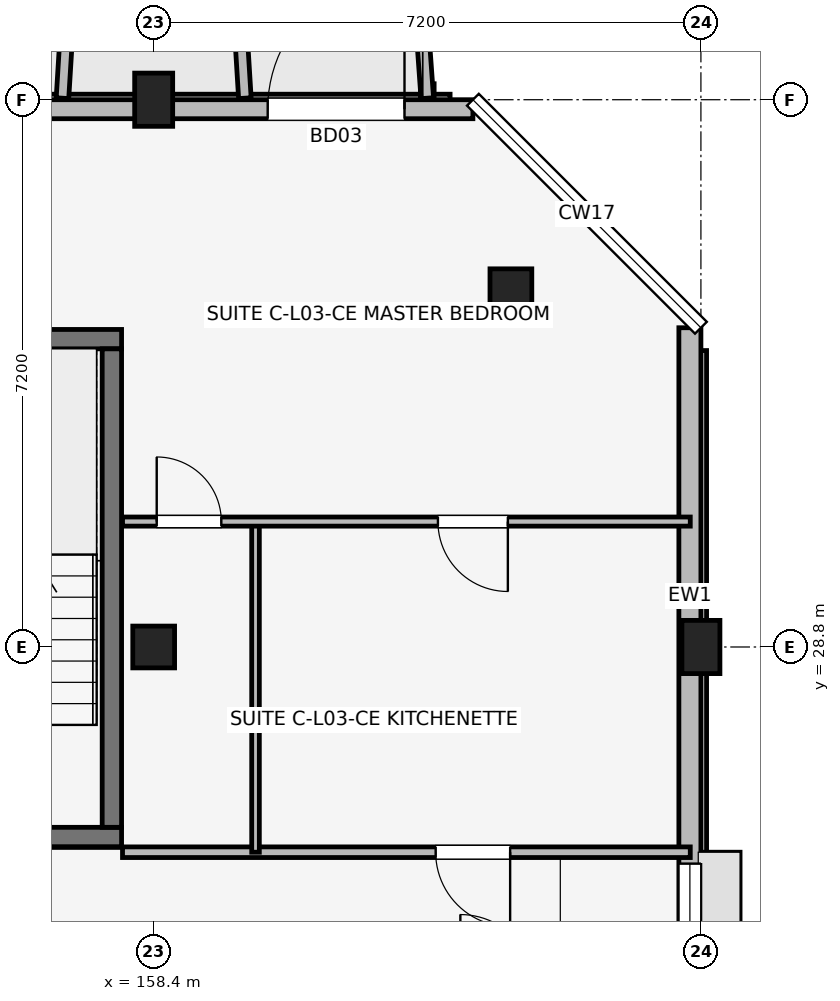
"""IFC4 building model, lengths in metres.
Left out: names, types, materials, properties, quantities, classifications, styles, units other than length and angle.
Written with IfcOpenShell. Run it as: python <this file> out.ifc"""

import sys

from ifc_helpers import new_model, si_unit, direction, frame, frame_2d, origin, origin_2d, place, context, subcontext, project, spatial, rectangle, extrude, element, fill, save


model = new_model("IFC4")
c1 = context("Model", 3, precision=1e-05, world=origin(), true_north=direction((0.0, 1.0)))
c2 = subcontext(c1, "Body", "Model", "MODEL_VIEW")
j1 = project(units=[si_unit("LENGTHUNIT", "METRE"), si_unit("PLANEANGLEUNIT", "RADIAN")], contexts=[c1])
p1 = place(None, origin())
s1 = spatial("IfcSite", under=j1, at=p1, CompositionType="ELEMENT")
p2 = place(p1, origin())
s2 = spatial("IfcBuilding", under=s1, at=p2, CompositionType="ELEMENT")
p3 = place(p2, frame((0.0, 0.0, 11.85)))
s3 = spatial("IfcBuildingStorey", under=s2, at=p3, CompositionType="ELEMENT", Elevation=11.85)
p4 = place(p3, frame((158.4, 28.8, 0.0), z_axis=(0.0, 0.0, 1.0), x_axis=(1.0, 0.0, 0.0)))
e1 = element("IfcColumn", 1, at=p4, inside=s3, PredefinedType="COLUMN", context=c2, shape_type="SweptSolid", body=[
    extrude(rectangle(XDim=0.55, YDim=0.55, at=origin_2d()), origin(), (0.0, 0.0, 1.0), 3.15),
])
for number, where, z_axis, x_axis in (
    (2, (158.4, 36.0, 0.0), (0.0, 0.0, 1.0), (1.0, 0.0, 0.0)),
    (3, (165.6, 28.8, 0.0), (0.0, 0.0, 1.0), (1.0, 0.0, 0.0)),
):
    element("IfcColumn", number, at=place(p3, frame(where, z_axis=z_axis, x_axis=x_axis)), inside=s3, PredefinedType="COLUMN", context=c2, shape_type="SweptSolid", body=[
        extrude(rectangle(XDim=0.5, YDim=0.7, at=origin_2d()), origin(), (0.0, 0.0, 1.0), 3.15),
    ])
p5 = place(p3, frame((163.1, 33.5, 0.0), z_axis=(0.0, 0.0, 1.0), x_axis=(1.0, 0.0, 0.0)))
e4 = element("IfcColumn", 4, at=p5, inside=s3, PredefinedType="COLUMN", context=c2, shape_type="SweptSolid", body=[
    extrude(rectangle(XDim=0.55, YDim=0.55, at=origin_2d()), origin(), (0.0, 0.0, 1.0), 3.15),
])
p6 = place(p3, frame((154.673, 26.3, 0.0), z_axis=(0.0, 0.0, 1.0), x_axis=(1.0, 0.0, 0.0)))
e5 = element("IfcWall", 5, at=p6, inside=s3, PredefinedType="SHEAR", context=c2, shape_type="SweptSolid", body=[
    extrude(rectangle(XDim=3.305, YDim=0.255, at=frame_2d((1.652, 0.0))), origin(), (0.0, 0.0, 1.0), 3.15),
])
p7 = place(p6, frame((1.127, 0.0, 0.0)))
e6 = element("IfcOpeningElement", 6, at=p7, cuts=e5, PredefinedType="OPENING", context=c2, shape_type="SweptSolid", body=[
    extrude(rectangle(XDim=1.05, YDim=2.12, at=frame_2d((0.525, 1.06))), frame((0.0, 0.137, 0.0), z_axis=(0.0, -1.0, 0.0), x_axis=(1.0, 0.0, 0.0)), (0.0, 0.0, 1.0), 0.275),
])
p8 = place(p3, frame((154.673, 32.85, 0.0), z_axis=(0.0, 0.0, 1.0), x_axis=(1.0, 0.0, 0.0)))
e7 = element("IfcWall", 7, at=p8, inside=s3, PredefinedType="SHEAR", context=c2, shape_type="SweptSolid", body=[
    extrude(rectangle(XDim=3.305, YDim=0.255, at=frame_2d((1.652, 0.0))), origin(), (0.0, 0.0, 1.0), 3.15),
])
p9 = place(p3, frame((157.85, 26.427, 0.0), z_axis=(0.0, 0.0, 1.0), x_axis=(0.0, 1.0, 0.0)))
e8 = element("IfcWall", 8, at=p9, inside=s3, PredefinedType="SHEAR", context=c2, shape_type="SweptSolid", body=[
    extrude(rectangle(XDim=6.295, YDim=0.255, at=frame_2d((3.147, 0.0))), origin(), (0.0, 0.0, 1.0), 3.15),
])
p10 = place(p3, frame((165.455, 17.4, 0.0), z_axis=(0.0, 0.0, 1.0), x_axis=(0.0, 1.0, 0.0)))
e9 = element("IfcWall", 9, at=p10, inside=s3, PredefinedType="SOLIDWALL", context=c2, shape_type="SweptSolid", body=[
    extrude(rectangle(XDim=15.6, YDim=0.29, at=frame_2d((7.8, 0.0))), origin(), (0.0, 0.0, 1.0), 2.38),
])
p11 = place(p10, frame((7.05, 0.0, 1.05)))
e10 = element("IfcOpeningElement", 10, at=p11, cuts=e9, PredefinedType="OPENING", context=c2, shape_type="SweptSolid", body=[
    extrude(rectangle(XDim=1.5, YDim=1.15, at=frame_2d((0.75, 0.575))), frame((0.0, 0.155, 0.0), z_axis=(0.0, -1.0, 0.0), x_axis=(1.0, 0.0, 0.0)), (0.0, 0.0, 1.0), 0.31),
])
p12 = place(p10, frame((1.3, 0.0, 0.67)))
e11 = element("IfcOpeningElement", 11, at=p12, cuts=e9, PredefinedType="OPENING", context=c2, shape_type="SweptSolid", body=[
    extrude(rectangle(XDim=1.42, YDim=1.6, at=frame_2d((0.71, 0.8))), frame((0.0, 0.155, 0.0), z_axis=(0.0, -1.0, 0.0), x_axis=(1.0, 0.0, 0.0)), (0.0, 0.0, 1.0), 0.31),
])
p13 = place(p3, frame((162.6, 35.875, 0.0), z_axis=(0.0, 0.0, 1.0), x_axis=(-1.0, 0.0, 0.0)))
e12 = element("IfcWall", 12, at=p13, inside=s3, PredefinedType="SOLIDWALL", context=c2, shape_type="SweptSolid", body=[
    extrude(rectangle(XDim=30.0, YDim=0.25, at=frame_2d((15.0, 0.0))), origin(), (0.0, 0.0, 1.0), 2.43),
])
p14 = place(p13, frame((29.025, 0.0, 0.0), z_axis=(0.0, 0.0, 1.0), x_axis=(-1.0, 0.0, 0.0)))
e13 = element("IfcOpeningElement", 13, at=p14, cuts=e12, PredefinedType="OPENING", context=c2, shape_type="SweptSolid", body=[
    extrude(rectangle(XDim=1.65, YDim=2.15, at=frame_2d((0.825, 1.075))), frame((0.0, 0.135, 0.0), z_axis=(0.0, -1.0, 0.0), x_axis=(1.0, 0.0, 0.0)), (0.0, 0.0, 1.0), 0.27),
])
p15 = place(p13, frame((2.7, 0.0, 0.0), z_axis=(0.0, 0.0, 1.0), x_axis=(-1.0, 0.0, 0.0)))
e14 = element("IfcOpeningElement", 14, at=p15, cuts=e12, PredefinedType="OPENING", context=c2, shape_type="SweptSolid", body=[
    extrude(rectangle(XDim=1.8, YDim=2.15, at=frame_2d((0.9, 1.075))), frame((0.0, 0.135, 0.0), z_axis=(0.0, -1.0, 0.0), x_axis=(1.0, 0.0, 0.0)), (0.0, 0.0, 1.0), 0.27),
])
p16 = place(p13, frame((15.43, 0.0, 0.5)))
e15 = element("IfcOpeningElement", 15, at=p16, cuts=e12, PredefinedType="OPENING", context=c2, shape_type="SweptSolid", body=[
    extrude(rectangle(XDim=0.75, YDim=1.75, at=frame_2d((0.375, 0.875))), frame((0.0, 0.135, 0.0), z_axis=(0.0, -1.0, 0.0), x_axis=(1.0, 0.0, 0.0)), (0.0, 0.0, 1.0), 0.27),
])
p17 = place(p13, frame((8.075, 0.0, 0.67)))
e16 = element("IfcOpeningElement", 16, at=p17, cuts=e12, PredefinedType="OPENING", context=c2, shape_type="SweptSolid", body=[
    extrude(rectangle(XDim=2.0, YDim=1.65, at=frame_2d((1.0, 0.825))), frame((0.0, 0.135, 0.0), z_axis=(0.0, -1.0, 0.0), x_axis=(1.0, 0.0, 0.0)), (0.0, 0.0, 1.0), 0.27),
])
p18 = place(p13, frame((19.97, 0.0, 0.7)))
e17 = element("IfcOpeningElement", 17, at=p18, cuts=e12, PredefinedType="OPENING", context=c2, shape_type="SweptSolid", body=[
    extrude(rectangle(XDim=1.86, YDim=1.6, at=frame_2d((0.93, 0.8))), frame((0.0, 0.135, 0.0), z_axis=(0.0, -1.0, 0.0), x_axis=(1.0, 0.0, 0.0)), (0.0, 0.0, 1.0), 0.27),
])
p19 = place(p3, frame((157.2, 36.02, 0.0), z_axis=(0.0, 0.0, 1.0), x_axis=(0.061170732449, 0.998127317276, 0.0)))
e18 = element("IfcWall", 18, at=p19, inside=s3, PredefinedType="ELEMENTEDWALL", context=c2, shape_type="SweptSolid", body=[
    extrude(rectangle(XDim=1.964, YDim=0.165, at=frame_2d((0.982, 0.0))), origin(), (0.0, 0.0, 1.0), 2.58),
])
p20 = place(p3, frame((159.6, 36.02, 0.0), z_axis=(0.0, 0.0, 1.0), x_axis=(-0.061170732449, 0.998127317276, 0.0)))
e19 = element("IfcWall", 19, at=p20, inside=s3, PredefinedType="ELEMENTEDWALL", context=c2, shape_type="SweptSolid", body=[
    extrude(rectangle(XDim=1.964, YDim=0.165, at=frame_2d((0.982, 0.0))), origin(), (0.0, 0.0, 1.0), 2.95),
])
p21 = place(p3, frame((162.0, 36.02, 0.0), z_axis=(0.0, 0.0, 1.0), x_axis=(-0.071194071069, 0.997462482625, 0.0)))
e20 = element("IfcWall", 20, at=p21, inside=s3, PredefinedType="ELEMENTEDWALL", context=c2, shape_type="SweptSolid", body=[
    extrude(rectangle(XDim=1.965, YDim=0.165, at=frame_2d((0.982, 0.0))), origin(), (0.0, 0.0, 1.0), 2.95),
])
p22 = place(p3, frame((157.99, 26.1, 0.0), z_axis=(0.0, 0.0, 1.0), x_axis=(1.0, 0.0, 0.0)))
e21 = element("IfcWall", 21, at=p22, inside=s3, PredefinedType="PARTITIONING", context=c2, shape_type="SweptSolid", body=[
    extrude(rectangle(XDim=7.47, YDim=0.14, at=frame_2d((3.735, 0.0))), origin(), (0.0, 0.0, 1.0), 2.38),
])
p23 = place(p22, frame((5.1, 0.0, 0.0), z_axis=(0.0, 0.0, 1.0), x_axis=(-1.0, 0.0, 0.0)))
e22 = element("IfcOpeningElement", 22, at=p23, cuts=e21, PredefinedType="OPENING", context=c2, shape_type="SweptSolid", body=[
    extrude(rectangle(XDim=0.98, YDim=2.1, at=frame_2d((0.49, 1.05))), frame((0.0, 0.08, 0.0), z_axis=(0.0, -1.0, 0.0), x_axis=(1.0, 0.0, 0.0)), (0.0, 0.0, 1.0), 0.16),
])
p24 = place(p3, frame((159.74, 26.1, 0.0), z_axis=(0.0, 0.0, 1.0), x_axis=(0.0, 1.0, 0.0)))
e23 = element("IfcWall", 23, at=p24, inside=s3, PredefinedType="PARTITIONING", context=c2, shape_type="SweptSolid", body=[
    extrude(rectangle(XDim=4.35, YDim=0.1, at=frame_2d((2.175, 0.0))), origin(), (0.0, 0.0, 1.0), 2.375),
])
p25 = place(p3, frame((157.99, 30.45, 0.0), z_axis=(0.0, 0.0, 1.0), x_axis=(1.0, 0.0, 0.0)))
e24 = element("IfcWall", 24, at=p25, inside=s3, PredefinedType="PARTITIONING", context=c2, shape_type="SweptSolid", body=[
    extrude(rectangle(XDim=7.47, YDim=0.12, at=frame_2d((3.735, 0.0))), origin(), (0.0, 0.0, 1.0), 2.38),
])
p26 = place(p25, frame((0.45, 0.0, 0.0)))
e25 = element("IfcOpeningElement", 25, at=p26, cuts=e24, PredefinedType="OPENING", context=c2, shape_type="SweptSolid", body=[
    extrude(rectangle(XDim=0.85, YDim=2.08, at=frame_2d((0.425, 1.04))), frame((0.0, 0.07, 0.0), z_axis=(0.0, -1.0, 0.0), x_axis=(1.0, 0.0, 0.0)), (0.0, 0.0, 1.0), 0.14),
])
p27 = place(p25, frame((5.07, 0.0, 0.0), z_axis=(0.0, 0.0, 1.0), x_axis=(-1.0, 0.0, 0.0)))
e26 = element("IfcOpeningElement", 26, at=p27, cuts=e24, PredefinedType="OPENING", context=c2, shape_type="SweptSolid", body=[
    extrude(rectangle(XDim=0.92, YDim=2.08, at=frame_2d((0.46, 1.04))), frame((0.0, 0.07, 0.0), z_axis=(0.0, -1.0, 0.0), x_axis=(1.0, 0.0, 0.0)), (0.0, 0.0, 1.0), 0.14),
])
p28 = place(p15, origin())
e27 = element("IfcDoor", 27, at=p28, inside=s3, OperationType="SINGLE_SWING_LEFT", PredefinedType="DOOR", context=c2, shape_type="SweptSolid", body=[
    extrude(rectangle(XDim=1.8, YDim=2.15, at=frame_2d((0.9, 1.075))), frame((0.0, 0.025, 0.0), z_axis=(0.0, -1.0, 0.0), x_axis=(1.0, 0.0, 0.0)), (0.0, 0.0, 1.0), 0.05),
])
fill(e14, e27)
p29 = place(p11, origin())
e28 = element("IfcWindow", 28, at=p29, inside=s3, PartitioningType="SINGLE_PANEL", PredefinedType="WINDOW", context=c2, shape_type="SweptSolid", body=[
    extrude(rectangle(XDim=1.5, YDim=1.15, at=frame_2d((0.75, 0.575))), frame((0.0, 0.03, 0.0), z_axis=(0.0, -1.0, 0.0), x_axis=(1.0, 0.0, 0.0)), (0.0, 0.0, 1.0), 0.06),
])
fill(e10, e28)
p30 = place(p23, origin())
e29 = element("IfcDoor", 29, at=p30, inside=s3, OperationType="SINGLE_SWING_RIGHT", PredefinedType="DOOR", context=c2, shape_type="SweptSolid", body=[
    extrude(rectangle(XDim=0.98, YDim=2.1, at=frame_2d((0.49, 1.05))), frame((0.0, 0.025, 0.0), z_axis=(0.0, -1.0, 0.0), x_axis=(1.0, 0.0, 0.0)), (0.0, 0.0, 1.0), 0.05),
])
fill(e22, e29)
p31 = place(p26, origin())
e30 = element("IfcDoor", 30, at=p31, inside=s3, OperationType="SINGLE_SWING_LEFT", PredefinedType="DOOR", context=c2, shape_type="SweptSolid", body=[
    extrude(rectangle(XDim=0.85, YDim=2.08, at=frame_2d((0.425, 1.04))), frame((0.0, 0.025, 0.0), z_axis=(0.0, -1.0, 0.0), x_axis=(1.0, 0.0, 0.0)), (0.0, 0.0, 1.0), 0.05),
])
fill(e25, e30)
p32 = place(p27, origin())
e31 = element("IfcDoor", 31, at=p32, inside=s3, OperationType="SINGLE_SWING_RIGHT", PredefinedType="DOOR", context=c2, shape_type="SweptSolid", body=[
    extrude(rectangle(XDim=0.92, YDim=2.08, at=frame_2d((0.46, 1.04))), frame((0.0, 0.025, 0.0), z_axis=(0.0, -1.0, 0.0), x_axis=(1.0, 0.0, 0.0)), (0.0, 0.0, 1.0), 0.05),
])
fill(e26, e31)
save(model, sys.argv[1])
